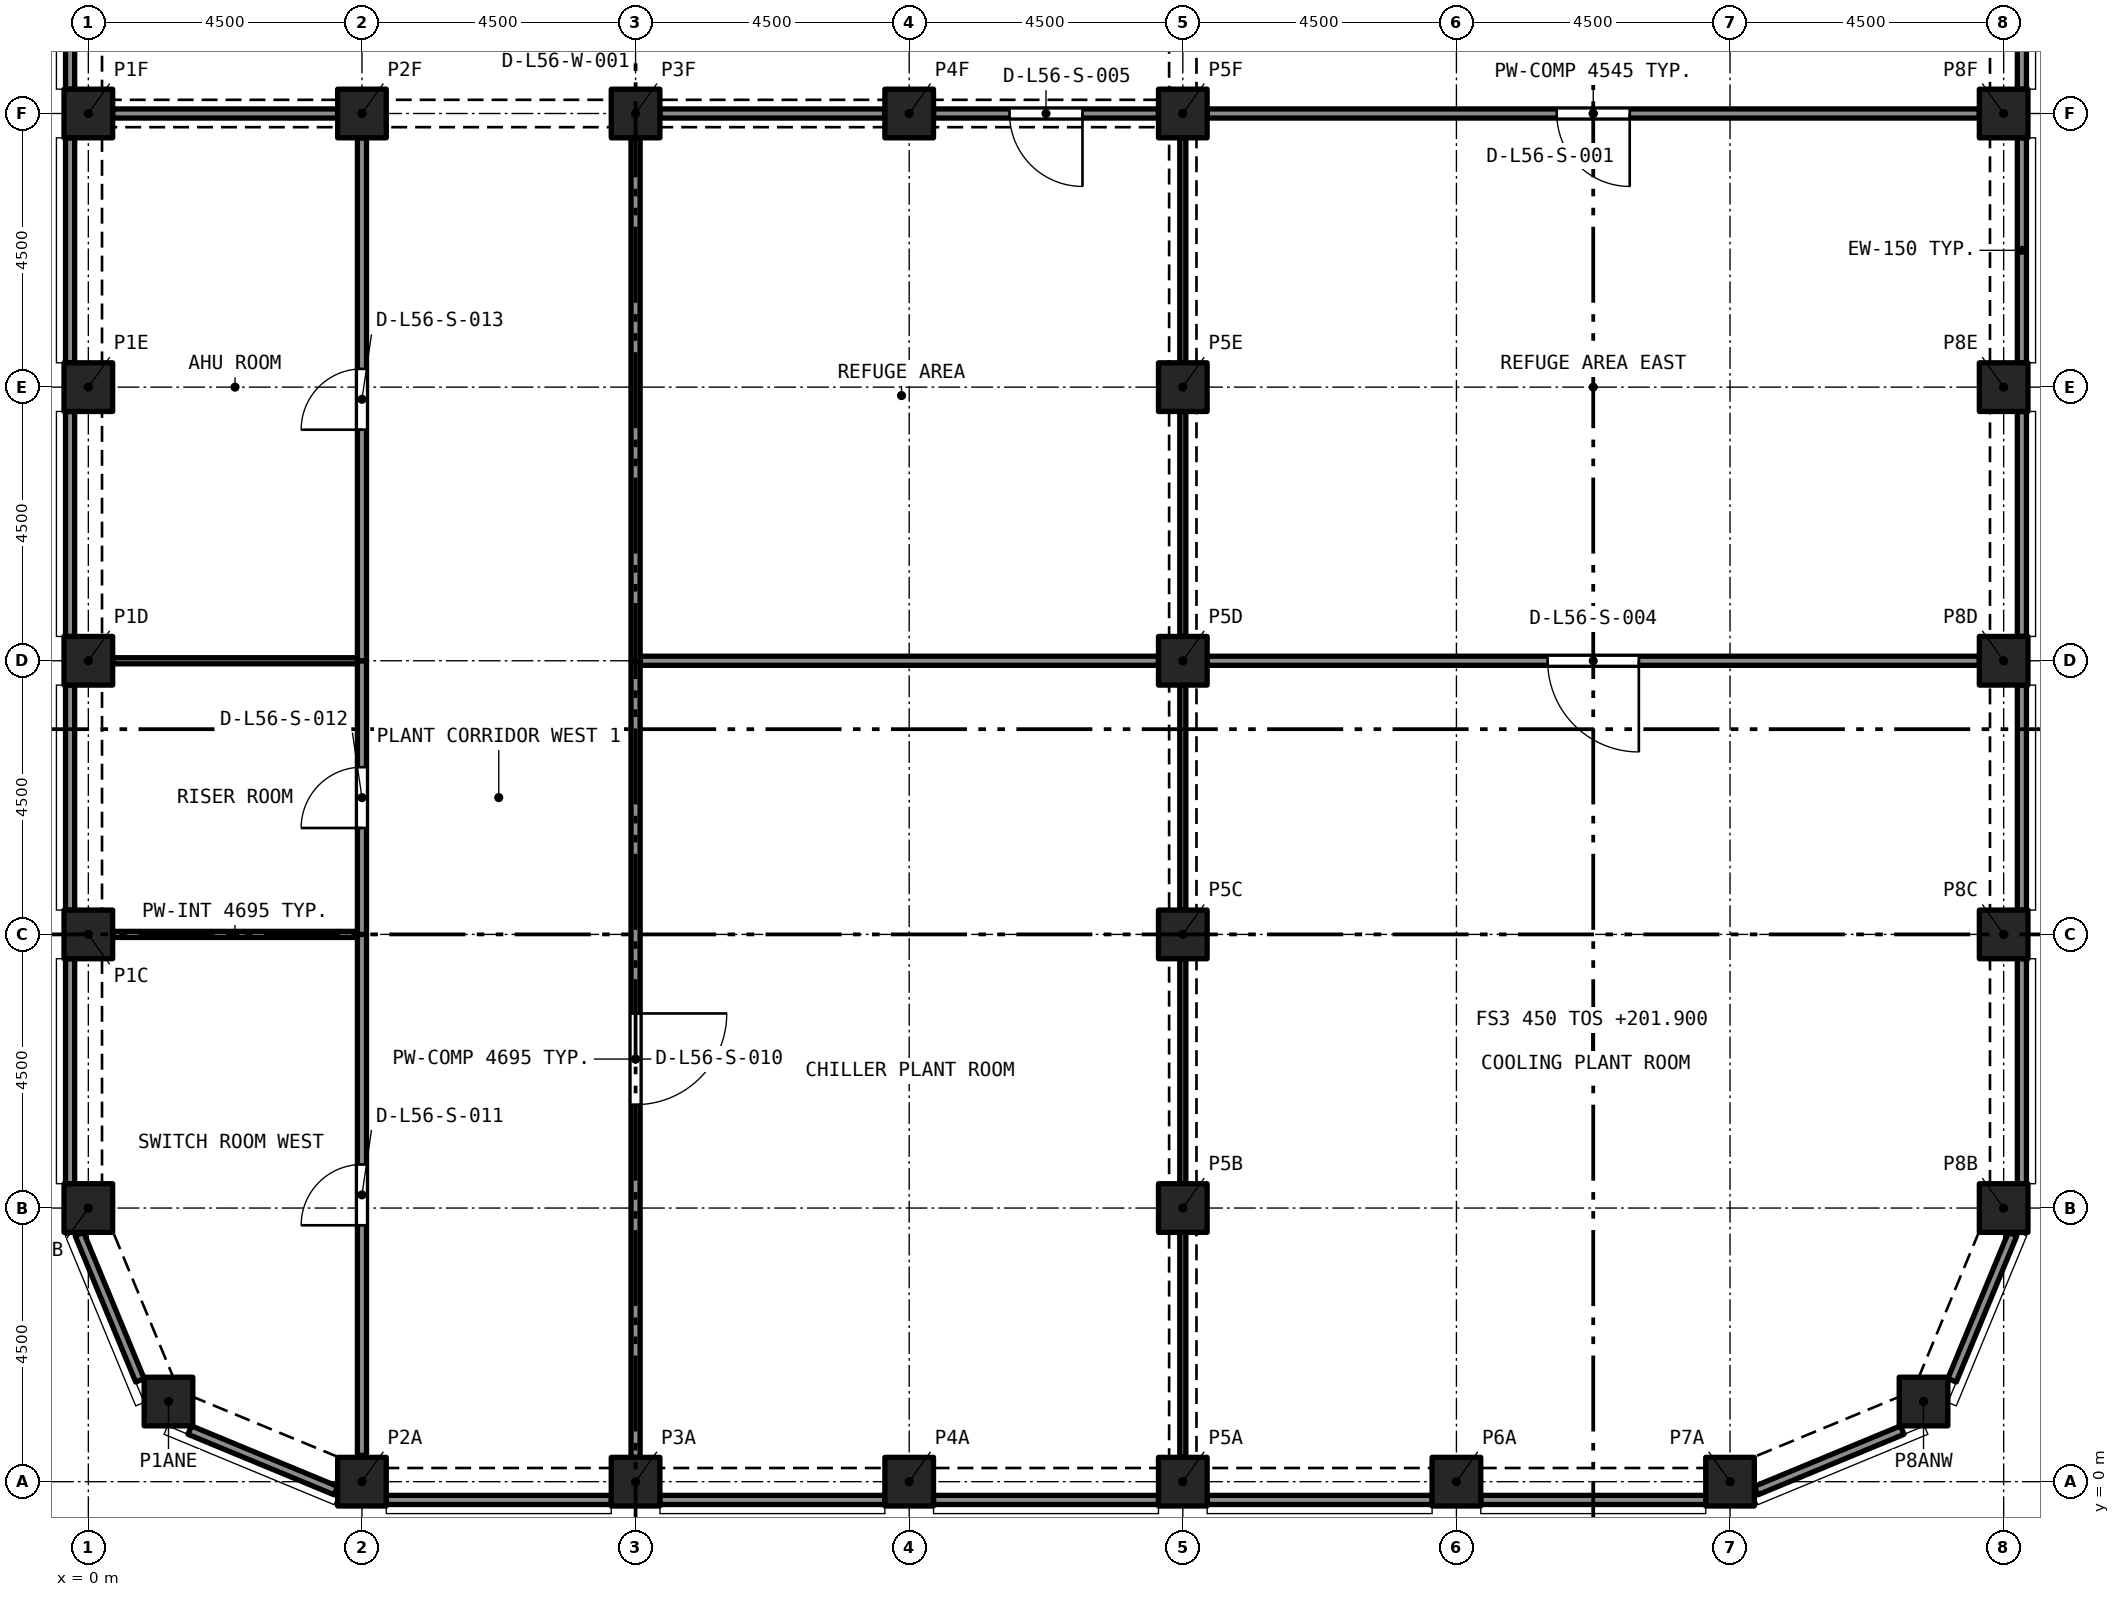
"""IFC4 building model, lengths in metres.
Left out: names, types, materials, properties, quantities, classifications, styles, units other than length and angle.
Written with IfcOpenShell. Run it as: python <this file> out.ifc"""

import sys

from ifc_helpers import new_model, si_unit, direction, frame, frame_2d, origin, origin_2d, place, context, subcontext, project, spatial, rectangle, extrude, element, fill, save


model = new_model("IFC4")
c1 = context("Model", 3, precision=1e-05, world=origin(), true_north=direction((0.0, 1.0)))
c2 = subcontext(c1, "Body", "Model", "MODEL_VIEW")
j1 = project(units=[si_unit("LENGTHUNIT", "METRE"), si_unit("PLANEANGLEUNIT", "RADIAN")], contexts=[c1])
p1 = place(None, origin())
s1 = spatial("IfcSite", under=j1, at=p1, CompositionType="ELEMENT")
p2 = place(p1, origin())
s2 = spatial("IfcBuilding", under=s1, at=p2, CompositionType="ELEMENT")
p3 = place(p2, frame((0.0, 0.0, 201.9)))
s3 = spatial("IfcBuildingStorey", under=s2, at=p3, CompositionType="ELEMENT", Elevation=201.9)
for number, where, z_axis, x_axis in (
    (1, (4.5, 0.0, 0.0), (0.0, 0.0, 1.0), (1.0, 0.0, 0.0)),
    (2, (9.0, 0.0, 0.0), (0.0, 0.0, 1.0), (1.0, 0.0, 0.0)),
    (3, (13.5, 0.0, 0.0), (0.0, 0.0, 1.0), (1.0, 0.0, 0.0)),
    (4, (18.0, 0.0, 0.0), (0.0, 0.0, 1.0), (1.0, 0.0, 0.0)),
    (5, (22.5, 0.0, 0.0), (0.0, 0.0, 1.0), (1.0, 0.0, 0.0)),
    (6, (27.0, 0.0, 0.0), (0.0, 0.0, 1.0), (1.0, 0.0, 0.0)),
    (7, (1.318, 1.318, 0.0), (0.0, 0.0, 1.0), (1.0, 0.0, 0.0)),
    (8, (30.182, 1.318, 0.0), (0.0, 0.0, 1.0), (1.0, 0.0, 0.0)),
    (9, (0.0, 4.5, 0.0), (0.0, 0.0, 1.0), (1.0, 0.0, 0.0)),
    (10, (18.0, 4.5, 0.0), (0.0, 0.0, 1.0), (1.0, 0.0, 0.0)),
    (11, (31.5, 4.5, 0.0), (0.0, 0.0, 1.0), (1.0, 0.0, 0.0)),
    (12, (0.0, 9.0, 0.0), (0.0, 0.0, 1.0), (1.0, 0.0, 0.0)),
    (13, (18.0, 9.0, 0.0), (0.0, 0.0, 1.0), (1.0, 0.0, 0.0)),
    (14, (31.5, 9.0, 0.0), (0.0, 0.0, 1.0), (1.0, 0.0, 0.0)),
    (15, (0.0, 13.5, 0.0), (0.0, 0.0, 1.0), (1.0, 0.0, 0.0)),
    (16, (18.0, 13.5, 0.0), (0.0, 0.0, 1.0), (1.0, 0.0, 0.0)),
    (17, (31.5, 13.5, 0.0), (0.0, 0.0, 1.0), (1.0, 0.0, 0.0)),
    (18, (0.0, 18.0, 0.0), (0.0, 0.0, 1.0), (1.0, 0.0, 0.0)),
    (19, (18.0, 18.0, 0.0), (0.0, 0.0, 1.0), (1.0, 0.0, 0.0)),
    (20, (31.5, 18.0, 0.0), (0.0, 0.0, 1.0), (1.0, 0.0, 0.0)),
    (21, (0.0, 22.5, 0.0), (0.0, 0.0, 1.0), (1.0, 0.0, 0.0)),
    (22, (4.5, 22.5, 0.0), (0.0, 0.0, 1.0), (1.0, 0.0, 0.0)),
    (23, (9.0, 22.5, 0.0), (0.0, 0.0, 1.0), (1.0, 0.0, 0.0)),
    (24, (13.5, 22.5, 0.0), (0.0, 0.0, 1.0), (1.0, 0.0, 0.0)),
    (25, (18.0, 22.5, 0.0), (0.0, 0.0, 1.0), (1.0, 0.0, 0.0)),
    (26, (31.5, 22.5, 0.0), (0.0, 0.0, 1.0), (1.0, 0.0, 0.0)),
):
    element("IfcColumn", number, at=place(p3, frame(where, z_axis=z_axis, x_axis=x_axis)), inside=s3, PredefinedType="COLUMN", context=c2, shape_type="SweptSolid", body=[
        extrude(rectangle(XDim=0.8, YDim=0.8, at=origin_2d()), origin(), (0.0, 0.0, 1.0), 4.995),
    ])
for number, where, z_axis, x_axis in (
    (27, (29.833, 0.849, 0.0), (0.0, 0.0, 1.0), (-0.924, -0.383, 0.0)),
    (28, (31.647, 4.071, 0.0), (0.0, 0.0, 1.0), (-0.383, -0.924, 0.0)),
):
    element("IfcWall", number, at=place(p3, frame(where, z_axis=z_axis, x_axis=x_axis)), inside=s3, PredefinedType="SOLIDWALL", context=c2, shape_type="SweptSolid", body=[
        extrude(rectangle(XDim=2.602, YDim=0.15, at=frame_2d((1.301, 0.0))), origin(), (0.0, 0.0, 1.0), 4.995),
    ])
for number, where, z_axis, x_axis in (
    (29, (31.8, 8.6, 0.0), (0.0, 0.0, 1.0), (0.0, -1.0, 0.0)),
    (30, (31.8, 13.1, 0.0), (0.0, 0.0, 1.0), (0.0, -1.0, 0.0)),
    (31, (31.8, 17.6, 0.0), (0.0, 0.0, 1.0), (0.0, -1.0, 0.0)),
    (32, (31.8, 22.1, 0.0), (0.0, 0.0, 1.0), (0.0, -1.0, 0.0)),
    (33, (31.8, 26.6, 0.0), (0.0, 0.0, 1.0), (0.0, -1.0, 0.0)),
    (34, (-0.3, 22.9, 0.0), (0.0, 0.0, 1.0), (0.0, 1.0, 0.0)),
    (35, (-0.3, 18.4, 0.0), (0.0, 0.0, 1.0), (0.0, 1.0, 0.0)),
    (36, (-0.3, 13.9, 0.0), (0.0, 0.0, 1.0), (0.0, 1.0, 0.0)),
    (37, (-0.3, 9.4, 0.0), (0.0, 0.0, 1.0), (0.0, 1.0, 0.0)),
    (38, (-0.3, 4.9, 0.0), (0.0, 0.0, 1.0), (0.0, 1.0, 0.0)),
):
    element("IfcWall", number, at=place(p3, frame(where, z_axis=z_axis, x_axis=x_axis)), inside=s3, PredefinedType="SOLIDWALL", context=c2, shape_type="SweptSolid", body=[
        extrude(rectangle(XDim=3.7, YDim=0.15, at=frame_2d((1.85, 0.0))), origin(), (0.0, 0.0, 1.0), 4.995),
    ])
for number, where, z_axis, x_axis in (
    (39, (0.849, 1.667, 0.0), (0.0, 0.0, 1.0), (-0.383, 0.924, 0.0)),
    (40, (4.071, -0.147, 0.0), (0.0, 0.0, 1.0), (-0.924, 0.383, 0.0)),
):
    element("IfcWall", number, at=place(p3, frame(where, z_axis=z_axis, x_axis=x_axis)), inside=s3, PredefinedType="SOLIDWALL", context=c2, shape_type="SweptSolid", body=[
        extrude(rectangle(XDim=2.602, YDim=0.15, at=frame_2d((1.301, 0.0))), origin(), (0.0, 0.0, 1.0), 4.995),
    ])
for number, where, z_axis, x_axis in (
    (41, (8.6, -0.3, 0.0), (0.0, 0.0, 1.0), (-1.0, 0.0, 0.0)),
    (42, (13.1, -0.3, 0.0), (0.0, 0.0, 1.0), (-1.0, 0.0, 0.0)),
    (43, (17.6, -0.3, 0.0), (0.0, 0.0, 1.0), (-1.0, 0.0, 0.0)),
    (44, (22.1, -0.3, 0.0), (0.0, 0.0, 1.0), (-1.0, 0.0, 0.0)),
    (45, (26.6, -0.3, 0.0), (0.0, 0.0, 1.0), (-1.0, 0.0, 0.0)),
):
    element("IfcWall", number, at=place(p3, frame(where, z_axis=z_axis, x_axis=x_axis)), inside=s3, PredefinedType="SOLIDWALL", context=c2, shape_type="SweptSolid", body=[
        extrude(rectangle(XDim=3.7, YDim=0.15, at=frame_2d((1.85, 0.0))), origin(), (0.0, 0.0, 1.0), 4.995),
    ])
p4 = place(p3, frame((31.1, 22.5, 0.0), z_axis=(0.0, 0.0, 1.0), x_axis=(-1.0, 0.0, 0.0)))
e46 = element("IfcWall", 46, at=p4, inside=s3, PredefinedType="PARTITIONING", context=c2, shape_type="SweptSolid", body=[
    extrude(rectangle(XDim=12.7, YDim=0.15, at=frame_2d((6.35, 0.0))), origin(), (0.0, 0.0, 1.0), 4.545),
])
p5 = place(p4, frame((5.75, 0.0, 0.0)))
e47 = element("IfcOpeningElement", 47, at=p5, cuts=e46, PredefinedType="OPENING", context=c2, shape_type="SweptSolid", body=[
    extrude(rectangle(XDim=1.2, YDim=2.1, at=frame_2d((0.6, 1.05))), frame((0.0, 0.085, 0.0), z_axis=(0.0, -1.0, 0.0), x_axis=(1.0, 0.0, 0.0)), (0.0, 0.0, 1.0), 0.17),
])
p6 = place(p3, frame((31.1, 13.5, 0.0), z_axis=(0.0, 0.0, 1.0), x_axis=(-1.0, 0.0, 0.0)))
e48 = element("IfcWall", 48, at=p6, inside=s3, PredefinedType="PARTITIONING", context=c2, shape_type="SweptSolid", body=[
    extrude(rectangle(XDim=12.7, YDim=0.15, at=frame_2d((6.35, 0.0))), origin(), (0.0, 0.0, 1.0), 4.545),
])
p7 = place(p6, frame((5.6, 0.0, 0.0)))
e49 = element("IfcOpeningElement", 49, at=p7, cuts=e48, PredefinedType="OPENING", context=c2, shape_type="SweptSolid", body=[
    extrude(rectangle(XDim=1.5, YDim=2.4, at=frame_2d((0.75, 1.2))), frame((0.0, 0.085, 0.0), z_axis=(0.0, -1.0, 0.0), x_axis=(1.0, 0.0, 0.0)), (0.0, 0.0, 1.0), 0.17),
])
for number, where, z_axis, x_axis in (
    (50, (18.0, 0.4, 0.0), (0.0, 0.0, 1.0), (0.0, 1.0, 0.0)),
    (51, (18.0, 4.9, 0.0), (0.0, 0.0, 1.0), (0.0, 1.0, 0.0)),
    (52, (18.0, 9.4, 0.0), (0.0, 0.0, 1.0), (0.0, 1.0, 0.0)),
    (53, (18.0, 13.9, 0.0), (0.0, 0.0, 1.0), (0.0, 1.0, 0.0)),
    (54, (18.0, 18.4, 0.0), (0.0, 0.0, 1.0), (0.0, 1.0, 0.0)),
):
    element("IfcWall", number, at=place(p3, frame(where, z_axis=z_axis, x_axis=x_axis)), inside=s3, PredefinedType="PARTITIONING", context=c2, shape_type="SweptSolid", body=[
        extrude(rectangle(XDim=3.7, YDim=0.1, at=frame_2d((1.85, 0.0))), origin(), (0.0, 0.0, 1.0), 4.175),
    ])
p8 = place(p3, frame((17.6, 22.5, 0.0), z_axis=(0.0, 0.0, 1.0), x_axis=(-1.0, 0.0, 0.0)))
e55 = element("IfcWall", 55, at=p8, inside=s3, PredefinedType="PARTITIONING", context=c2, shape_type="SweptSolid", body=[
    extrude(rectangle(XDim=3.7, YDim=0.15, at=frame_2d((1.85, 0.0))), origin(), (0.0, 0.0, 1.0), 4.175),
])
p9 = place(p8, frame((1.25, 0.0, 0.0)))
e56 = element("IfcOpeningElement", 56, at=p9, cuts=e55, PredefinedType="OPENING", context=c2, shape_type="SweptSolid", body=[
    extrude(rectangle(XDim=1.2, YDim=2.1, at=frame_2d((0.6, 1.05))), frame((0.0, 0.085, 0.0), z_axis=(0.0, -1.0, 0.0), x_axis=(1.0, 0.0, 0.0)), (0.0, 0.0, 1.0), 0.17),
])
for number, where, z_axis, x_axis in (
    (57, (9.4, 22.5, 0.0), (0.0, 0.0, 1.0), (1.0, 0.0, 0.0)),
    (58, (0.4, 22.5, 0.0), (0.0, 0.0, 1.0), (1.0, 0.0, 0.0)),
):
    element("IfcWall", number, at=place(p3, frame(where, z_axis=z_axis, x_axis=x_axis)), inside=s3, PredefinedType="PARTITIONING", context=c2, shape_type="SweptSolid", body=[
        extrude(rectangle(XDim=3.7, YDim=0.15, at=frame_2d((1.85, 0.0))), origin(), (0.0, 0.0, 1.0), 4.175),
    ])
p10 = place(p3, frame((9.075, 13.5, 0.0), z_axis=(0.0, 0.0, 1.0), x_axis=(1.0, 0.0, 0.0)))
e59 = element("IfcWall", 59, at=p10, inside=s3, PredefinedType="PARTITIONING", context=c2, shape_type="SweptSolid", body=[
    extrude(rectangle(XDim=8.525, YDim=0.15, at=frame_2d((4.263, 0.0))), origin(), (0.0, 0.0, 1.0), 4.695),
])
p11 = place(p3, frame((9.0, 13.5, 0.0), z_axis=(0.0, 0.0, 1.0), x_axis=(0.0, -1.0, 0.0)))
e60 = element("IfcWall", 60, at=p11, inside=s3, PredefinedType="PARTITIONING", context=c2, shape_type="SweptSolid", body=[
    extrude(rectangle(XDim=13.1, YDim=0.15, at=frame_2d((6.55, 0.0))), origin(), (0.0, 0.0, 1.0), 4.695),
])
p12 = place(p11, frame((5.8, 0.0, 0.0)))
e61 = element("IfcOpeningElement", 61, at=p12, cuts=e60, PredefinedType="OPENING", context=c2, shape_type="SweptSolid", body=[
    extrude(rectangle(XDim=1.5, YDim=2.4, at=frame_2d((0.75, 1.2))), frame((0.0, 0.085, 0.0), z_axis=(0.0, -1.0, 0.0), x_axis=(1.0, 0.0, 0.0)), (0.0, 0.0, 1.0), 0.17),
])
p13 = place(p3, frame((9.0, 13.5, 0.0), z_axis=(0.0, 0.0, 1.0), x_axis=(0.0, 1.0, 0.0)))
e62 = element("IfcWall", 62, at=p13, inside=s3, PredefinedType="PARTITIONING", context=c2, shape_type="SweptSolid", body=[
    extrude(rectangle(XDim=8.6, YDim=0.15, at=frame_2d((4.3, 0.0))), origin(), (0.0, 0.0, 1.0), 4.695),
])
p14 = place(p3, frame((4.5, 0.433, 0.0), z_axis=(0.0, 0.0, 1.0), x_axis=(0.0, 1.0, 0.0)))
e63 = element("IfcWall", 63, at=p14, inside=s3, PredefinedType="PARTITIONING", context=c2, shape_type="SweptSolid", body=[
    extrude(rectangle(XDim=8.567, YDim=0.15, at=frame_2d((4.284, 0.0))), origin(), (0.0, 0.0, 1.0), 4.695),
])
p15 = place(p14, frame((3.783, 0.0, 0.0)))
e64 = element("IfcOpeningElement", 64, at=p15, cuts=e63, PredefinedType="OPENING", context=c2, shape_type="SweptSolid", body=[
    extrude(rectangle(XDim=1.0, YDim=2.1, at=frame_2d((0.5, 1.05))), frame((0.0, 0.085, 0.0), z_axis=(0.0, -1.0, 0.0), x_axis=(1.0, 0.0, 0.0)), (0.0, 0.0, 1.0), 0.17),
])
p16 = place(p3, frame((4.5, 9.0, 0.0), z_axis=(0.0, 0.0, 1.0), x_axis=(0.0, 1.0, 0.0)))
e65 = element("IfcWall", 65, at=p16, inside=s3, PredefinedType="PARTITIONING", context=c2, shape_type="SweptSolid", body=[
    extrude(rectangle(XDim=4.5, YDim=0.15, at=frame_2d((2.25, 0.0))), origin(), (0.0, 0.0, 1.0), 4.695),
])
p17 = place(p16, frame((1.75, 0.0, 0.0)))
e66 = element("IfcOpeningElement", 66, at=p17, cuts=e65, PredefinedType="OPENING", context=c2, shape_type="SweptSolid", body=[
    extrude(rectangle(XDim=1.0, YDim=2.1, at=frame_2d((0.5, 1.05))), frame((0.0, 0.085, 0.0), z_axis=(0.0, -1.0, 0.0), x_axis=(1.0, 0.0, 0.0)), (0.0, 0.0, 1.0), 0.17),
])
p18 = place(p3, frame((4.5, 13.5, 0.0), z_axis=(0.0, 0.0, 1.0), x_axis=(0.0, 1.0, 0.0)))
e67 = element("IfcWall", 67, at=p18, inside=s3, PredefinedType="PARTITIONING", context=c2, shape_type="SweptSolid", body=[
    extrude(rectangle(XDim=8.6, YDim=0.15, at=frame_2d((4.3, 0.0))), origin(), (0.0, 0.0, 1.0), 4.695),
])
p19 = place(p18, frame((3.8, 0.0, 0.0)))
e68 = element("IfcOpeningElement", 68, at=p19, cuts=e67, PredefinedType="OPENING", context=c2, shape_type="SweptSolid", body=[
    extrude(rectangle(XDim=1.0, YDim=2.1, at=frame_2d((0.5, 1.05))), frame((0.0, 0.085, 0.0), z_axis=(0.0, -1.0, 0.0), x_axis=(1.0, 0.0, 0.0)), (0.0, 0.0, 1.0), 0.17),
])
for number, where, z_axis, x_axis in (
    (69, (0.4, 9.0, 0.0), (0.0, 0.0, 1.0), (1.0, 0.0, 0.0)),
    (70, (0.4, 13.5, 0.0), (0.0, 0.0, 1.0), (1.0, 0.0, 0.0)),
):
    element("IfcWall", number, at=place(p3, frame(where, z_axis=z_axis, x_axis=x_axis)), inside=s3, PredefinedType="PARTITIONING", context=c2, shape_type="SweptSolid", body=[
        extrude(rectangle(XDim=4.025, YDim=0.1, at=frame_2d((2.013, 0.0))), origin(), (0.0, 0.0, 1.0), 4.695),
    ])
p20 = place(p5, origin())
e71 = element("IfcDoor", 71, at=p20, inside=s3, OperationType="SINGLE_SWING_RIGHT", PredefinedType="DOOR", context=c2, shape_type="SweptSolid", body=[
    extrude(rectangle(XDim=1.2, YDim=2.1, at=frame_2d((0.6, 1.05))), frame((0.0, 0.025, 0.0), z_axis=(0.0, -1.0, 0.0), x_axis=(1.0, 0.0, 0.0)), (0.0, 0.0, 1.0), 0.05),
])
fill(e47, e71)
p21 = place(p7, origin())
e72 = element("IfcDoor", 72, at=p21, inside=s3, OperationType="DOUBLE_DOOR_SINGLE_SWING", PredefinedType="DOOR", context=c2, shape_type="SweptSolid", body=[
    extrude(rectangle(XDim=1.5, YDim=2.4, at=frame_2d((0.75, 1.2))), frame((0.0, 0.025, 0.0), z_axis=(0.0, -1.0, 0.0), x_axis=(1.0, 0.0, 0.0)), (0.0, 0.0, 1.0), 0.05),
])
fill(e49, e72)
p22 = place(p9, origin())
e73 = element("IfcDoor", 73, at=p22, inside=s3, OperationType="SINGLE_SWING_LEFT", PredefinedType="DOOR", context=c2, shape_type="SweptSolid", body=[
    extrude(rectangle(XDim=1.2, YDim=2.1, at=frame_2d((0.6, 1.05))), frame((0.0, 0.025, 0.0), z_axis=(0.0, -1.0, 0.0), x_axis=(1.0, 0.0, 0.0)), (0.0, 0.0, 1.0), 0.05),
])
fill(e56, e73)
p23 = place(p12, origin())
e74 = element("IfcDoor", 74, at=p23, inside=s3, OperationType="DOUBLE_DOOR_SINGLE_SWING", PredefinedType="DOOR", context=c2, shape_type="SweptSolid", body=[
    extrude(rectangle(XDim=1.5, YDim=2.4, at=frame_2d((0.75, 1.2))), frame((0.0, 0.025, 0.0), z_axis=(0.0, -1.0, 0.0), x_axis=(1.0, 0.0, 0.0)), (0.0, 0.0, 1.0), 0.05),
])
fill(e61, e74)
p24 = place(p15, origin())
e75 = element("IfcDoor", 75, at=p24, inside=s3, OperationType="SINGLE_SWING_RIGHT", PredefinedType="DOOR", context=c2, shape_type="SweptSolid", body=[
    extrude(rectangle(XDim=1.0, YDim=2.1, at=frame_2d((0.5, 1.05))), frame((0.0, 0.025, 0.0), z_axis=(0.0, -1.0, 0.0), x_axis=(1.0, 0.0, 0.0)), (0.0, 0.0, 1.0), 0.05),
])
fill(e64, e75)
p25 = place(p17, origin())
e76 = element("IfcDoor", 76, at=p25, inside=s3, OperationType="SINGLE_SWING_RIGHT", PredefinedType="DOOR", context=c2, shape_type="SweptSolid", body=[
    extrude(rectangle(XDim=1.0, YDim=2.1, at=frame_2d((0.5, 1.05))), frame((0.0, 0.025, 0.0), z_axis=(0.0, -1.0, 0.0), x_axis=(1.0, 0.0, 0.0)), (0.0, 0.0, 1.0), 0.05),
])
fill(e66, e76)
p26 = place(p19, origin())
e77 = element("IfcDoor", 77, at=p26, inside=s3, OperationType="SINGLE_SWING_RIGHT", PredefinedType="DOOR", context=c2, shape_type="SweptSolid", body=[
    extrude(rectangle(XDim=1.0, YDim=2.1, at=frame_2d((0.5, 1.05))), frame((0.0, 0.025, 0.0), z_axis=(0.0, -1.0, 0.0), x_axis=(1.0, 0.0, 0.0)), (0.0, 0.0, 1.0), 0.05),
])
fill(e68, e77)
save(model, sys.argv[1])
